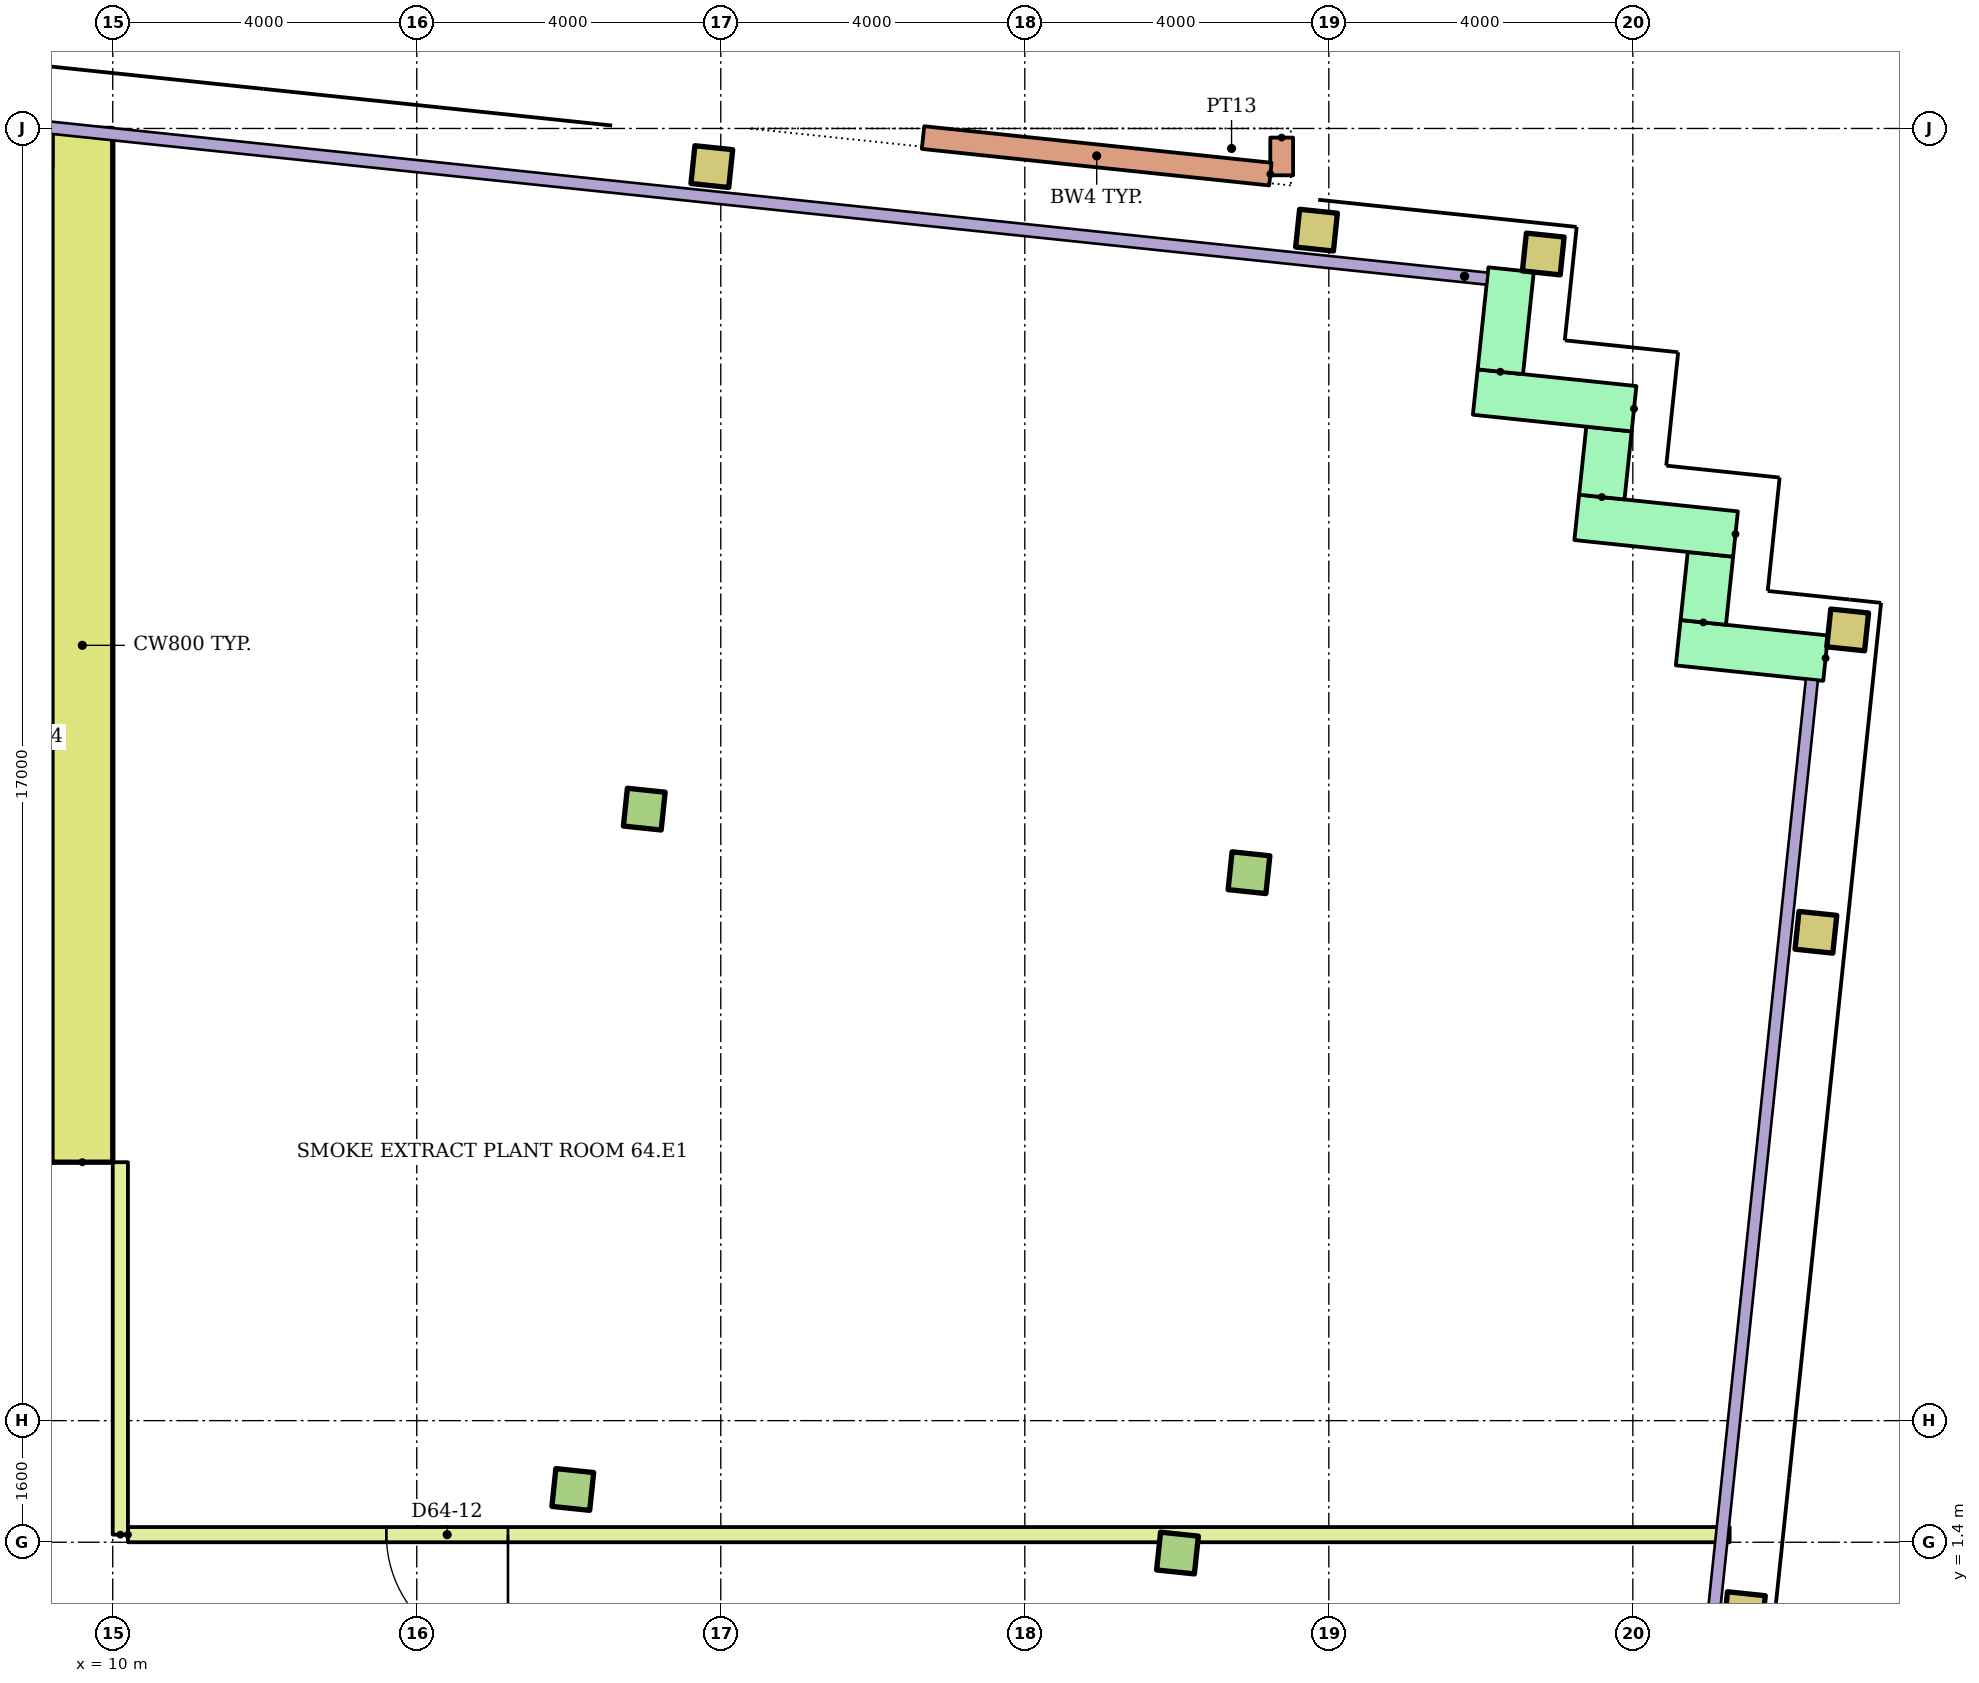
"""IFC4 building model, lengths in metres.
Left out: names, types, materials, properties, quantities, classifications, styles, units other than length and angle.
Written with IfcOpenShell. Run it as: python <this file> out.ifc"""

import sys

from ifc_helpers import new_model, si_unit, direction, frame, frame_2d, origin, origin_2d, place, context, subcontext, project, spatial, rectangle, hollow_rectangle, extrude, element, fill, save


model = new_model("IFC4")
c1 = context("Model", 3, precision=1e-05, world=origin(), true_north=direction((0.0, 1.0)))
c2 = subcontext(c1, "Body", "Model", "MODEL_VIEW")
j1 = project(units=[si_unit("LENGTHUNIT", "METRE"), si_unit("PLANEANGLEUNIT", "RADIAN")], contexts=[c1])
p1 = place(None, origin())
s1 = spatial("IfcSite", under=j1, at=p1, CompositionType="ELEMENT")
p2 = place(p1, origin())
s2 = spatial("IfcBuilding", under=s1, at=p2, CompositionType="ELEMENT")
p3 = place(p2, frame((0.0, 0.0, 249.2)))
s3 = spatial("IfcBuildingStorey", under=s2, at=p3, CompositionType="ELEMENT", Elevation=249.2)
for number, where, z_axis, x_axis in (
    (1, (16.053, 2.094, 0.0), (0.0, 0.0, 1.0), (0.995, -0.105, 0.0)),
    (2, (24.009, 1.258, 0.0), (0.0, 0.0, 1.0), (0.995, -0.105, 0.0)),
):
    element("IfcColumn", number, at=place(p3, frame(where, z_axis=z_axis, x_axis=x_axis)), inside=s3, PredefinedType="COLUMN", context=c2, shape_type="SweptSolid", body=[
        extrude(rectangle(XDim=0.5, YDim=0.5, at=origin_2d()), origin(), (0.0, 0.0, 1.0), 3.9),
    ])
p4 = place(p3, frame((31.468, 0.474, 0.0), z_axis=(0.0, 0.0, 1.0), x_axis=(0.994521895368, -0.104528463268, 0.0)))
e3 = element("IfcColumn", 3, at=p4, inside=s3, PredefinedType="COLUMN", context=c2, shape_type="SweptSolid", body=[
    extrude(hollow_rectangle(XDim=0.5, YDim=0.5, WallThickness=0.025, at=origin_2d()), origin(), (0.0, 0.0, 1.0), 3.9),
])
for number, where, z_axis, x_axis in (
    (4, (16.993, 11.045, 0.0), (0.0, 0.0, 1.0), (0.995, -0.105, 0.0)),
    (5, (24.95, 10.209, 0.0), (0.0, 0.0, 1.0), (0.995, -0.105, 0.0)),
):
    element("IfcColumn", number, at=place(p3, frame(where, z_axis=z_axis, x_axis=x_axis)), inside=s3, PredefinedType="COLUMN", context=c2, shape_type="SweptSolid", body=[
        extrude(rectangle(XDim=0.5, YDim=0.5, at=origin_2d()), origin(), (0.0, 0.0, 1.0), 3.9),
    ])
for number, where, z_axis, x_axis in (
    (6, (32.409, 9.425, 0.0), (0.0, 0.0, 1.0), (0.995, -0.105, 0.0)),
    (7, (32.827, 13.403, 0.0), (0.0, 0.0, 1.0), (0.995, -0.105, 0.0)),
    (8, (17.882, 19.498, 0.0), (0.0, 0.0, 1.0), (0.995, -0.105, 0.0)),
    (9, (25.838, 18.662, 0.0), (0.0, 0.0, 1.0), (0.995, -0.105, 0.0)),
    (10, (28.822, 18.349, 0.0), (0.0, 0.0, 1.0), (0.995, -0.105, 0.0)),
):
    element("IfcColumn", number, at=place(p3, frame(where, z_axis=z_axis, x_axis=x_axis)), inside=s3, PredefinedType="COLUMN", context=c2, shape_type="SweptSolid", body=[
        extrude(hollow_rectangle(XDim=0.5, YDim=0.5, WallThickness=0.025, at=origin_2d()), origin(), (0.0, 0.0, 1.0), 3.9),
    ])
p5 = place(p3, frame((32.536, 13.031, 0.0), z_axis=(0.0, 0.0, 1.0), x_axis=(-0.994534226826, 0.104411070641, 0.0)))
e11 = element("IfcWall", 11, at=p5, inside=s3, PredefinedType="STANDARD", context=c2, shape_type="SweptSolid", body=[
    extrude(rectangle(XDim=1.95, YDim=0.6, at=frame_2d((0.975, 0.0))), origin(), (0.0, 0.0, 1.0), 3.62),
])
p6 = place(p3, frame((30.927, 13.502, 0.0), z_axis=(0.0, 0.0, 1.0), x_axis=(0.104416541099, 0.994533652495, 0.0)))
e12 = element("IfcWall", 12, at=p6, inside=s3, PredefinedType="STANDARD", context=c2, shape_type="SweptSolid", body=[
    extrude(rectangle(XDim=0.9, YDim=0.6, at=frame_2d((0.45, 0.0))), origin(), (0.0, 0.0, 1.0), 3.62),
])
p7 = place(p3, frame((31.351, 14.664, 0.0), z_axis=(0.0, 0.0, 1.0), x_axis=(-0.994523910136, 0.104509292252, 0.0)))
e13 = element("IfcWall", 13, at=p7, inside=s3, PredefinedType="STANDARD", context=c2, shape_type="SweptSolid", body=[
    extrude(rectangle(XDim=2.1, YDim=0.6, at=frame_2d((1.05, 0.0))), origin(), (0.0, 0.0, 1.0), 3.62),
])
p8 = place(p3, frame((29.592, 15.151, 0.0), z_axis=(0.0, 0.0, 1.0), x_axis=(0.104444712852, 0.994530694326, 0.0)))
e14 = element("IfcWall", 14, at=p8, inside=s3, PredefinedType="STANDARD", context=c2, shape_type="SweptSolid", body=[
    extrude(rectangle(XDim=0.9, YDim=0.6, at=frame_2d((0.45, 0.0))), origin(), (0.0, 0.0, 1.0), 3.62),
])
p9 = place(p3, frame((30.015, 16.312, 0.0), z_axis=(0.0, 0.0, 1.0), x_axis=(-0.994510548187, 0.104636368175, 0.0)))
e15 = element("IfcWall", 15, at=p9, inside=s3, PredefinedType="STANDARD", context=c2, shape_type="SweptSolid", body=[
    extrude(rectangle(XDim=2.1, YDim=0.6, at=frame_2d((1.05, 0.0))), origin(), (0.0, 0.0, 1.0), 3.62),
])
p10 = place(p3, frame((28.257, 16.799, 0.0), z_axis=(0.0, 0.0, 1.0), x_axis=(0.104534153452, 0.994521297289, 0.0)))
e16 = element("IfcWall", 16, at=p10, inside=s3, PredefinedType="STANDARD", context=c2, shape_type="SweptSolid", body=[
    extrude(rectangle(XDim=1.35, YDim=0.6, at=frame_2d((0.675, 0.0))), origin(), (0.0, 0.0, 1.0), 3.62),
])
p11 = place(p3, frame((25.38, 19.88, 0.0), z_axis=(0.0, 0.0, 1.0), x_axis=(0.0, -1.0, 0.0)))
e17 = element("IfcWall", 17, at=p11, inside=s3, PredefinedType="PARAPET", context=c2, shape_type="SweptSolid", body=[
    extrude(rectangle(XDim=0.496, YDim=0.3, at=frame_2d((0.248, 0.0))), origin(), (0.0, 0.0, 1.0), 1.1),
])
p12 = place(p3, frame((25.231, 19.4, 0.0), z_axis=(0.0, 0.0, 1.0), x_axis=(-0.994523779096, 0.104510539239, 0.0)))
e18 = element("IfcWall", 18, at=p12, inside=s3, PredefinedType="PARAPET", context=c2, shape_type="SweptSolid", body=[
    extrude(rectangle(XDim=4.595, YDim=0.3, at=frame_2d((2.297, 0.0))), origin(), (0.0, 0.0, 1.0), 1.1),
])
p13 = place(p3, frame((9.6, 6.4, 0.0), z_axis=(0.0, 0.0, 1.0), x_axis=(0.0, 1.0, 0.0)))
e19 = element("IfcWall", 19, at=p13, inside=s3, PredefinedType="SHEAR", context=c2, shape_type="SweptSolid", body=[
    extrude(rectangle(XDim=13.6, YDim=0.8, at=frame_2d((6.8, 0.0))), origin(), (0.0, 0.0, 1.0), 3.62),
])
p14 = place(p3, frame((10.2, 1.5, 0.0)))
e20 = element("IfcWall", 20, at=p14, inside=s3, PredefinedType="PARTITIONING", context=c2, shape_type="SweptSolid", body=[
    extrude(rectangle(XDim=21.074, YDim=0.2, at=frame_2d((10.537, 0.0))), origin(), (0.0, 0.0, 1.0), 3.62),
])
p15 = place(p14, frame((3.4, 0.0, 0.0)))
e21 = element("IfcOpeningElement", 21, at=p15, cuts=e20, PredefinedType="OPENING", context=c2, shape_type="SweptSolid", body=[
    extrude(rectangle(XDim=1.6, YDim=2.4, at=frame_2d((0.8, 1.2))), frame((0.0, 0.11, 0.0), z_axis=(0.0, -1.0, 0.0), x_axis=(1.0, 0.0, 0.0)), (0.0, 0.0, 1.0), 0.22),
])
p16 = place(p3, frame((10.1, 1.5, 0.0), z_axis=(0.0, 0.0, 1.0), x_axis=(0.0, 1.0, 0.0)))
e22 = element("IfcWall", 22, at=p16, inside=s3, PredefinedType="PARTITIONING", context=c2, shape_type="SweptSolid", body=[
    extrude(rectangle(XDim=4.9, YDim=0.2, at=frame_2d((2.45, 0.0))), origin(), (0.0, 0.0, 1.0), 3.62),
])
p17 = place(p15, frame((1.6, 0.0, 0.0), z_axis=(0.0, 0.0, 1.0), x_axis=(-1.0, 0.0, 0.0)))
e23 = element("IfcDoor", 23, at=p17, inside=s3, OperationType="DOUBLE_DOOR_SINGLE_SWING", PredefinedType="DOOR", context=c2, shape_type="SweptSolid", body=[
    extrude(rectangle(XDim=1.6, YDim=2.4, at=frame_2d((0.8, 1.2))), frame((0.0, 0.025, 0.0), z_axis=(0.0, -1.0, 0.0), x_axis=(1.0, 0.0, 0.0)), (0.0, 0.0, 1.0), 0.05),
])
fill(e21, e23)
save(model, sys.argv[1])
